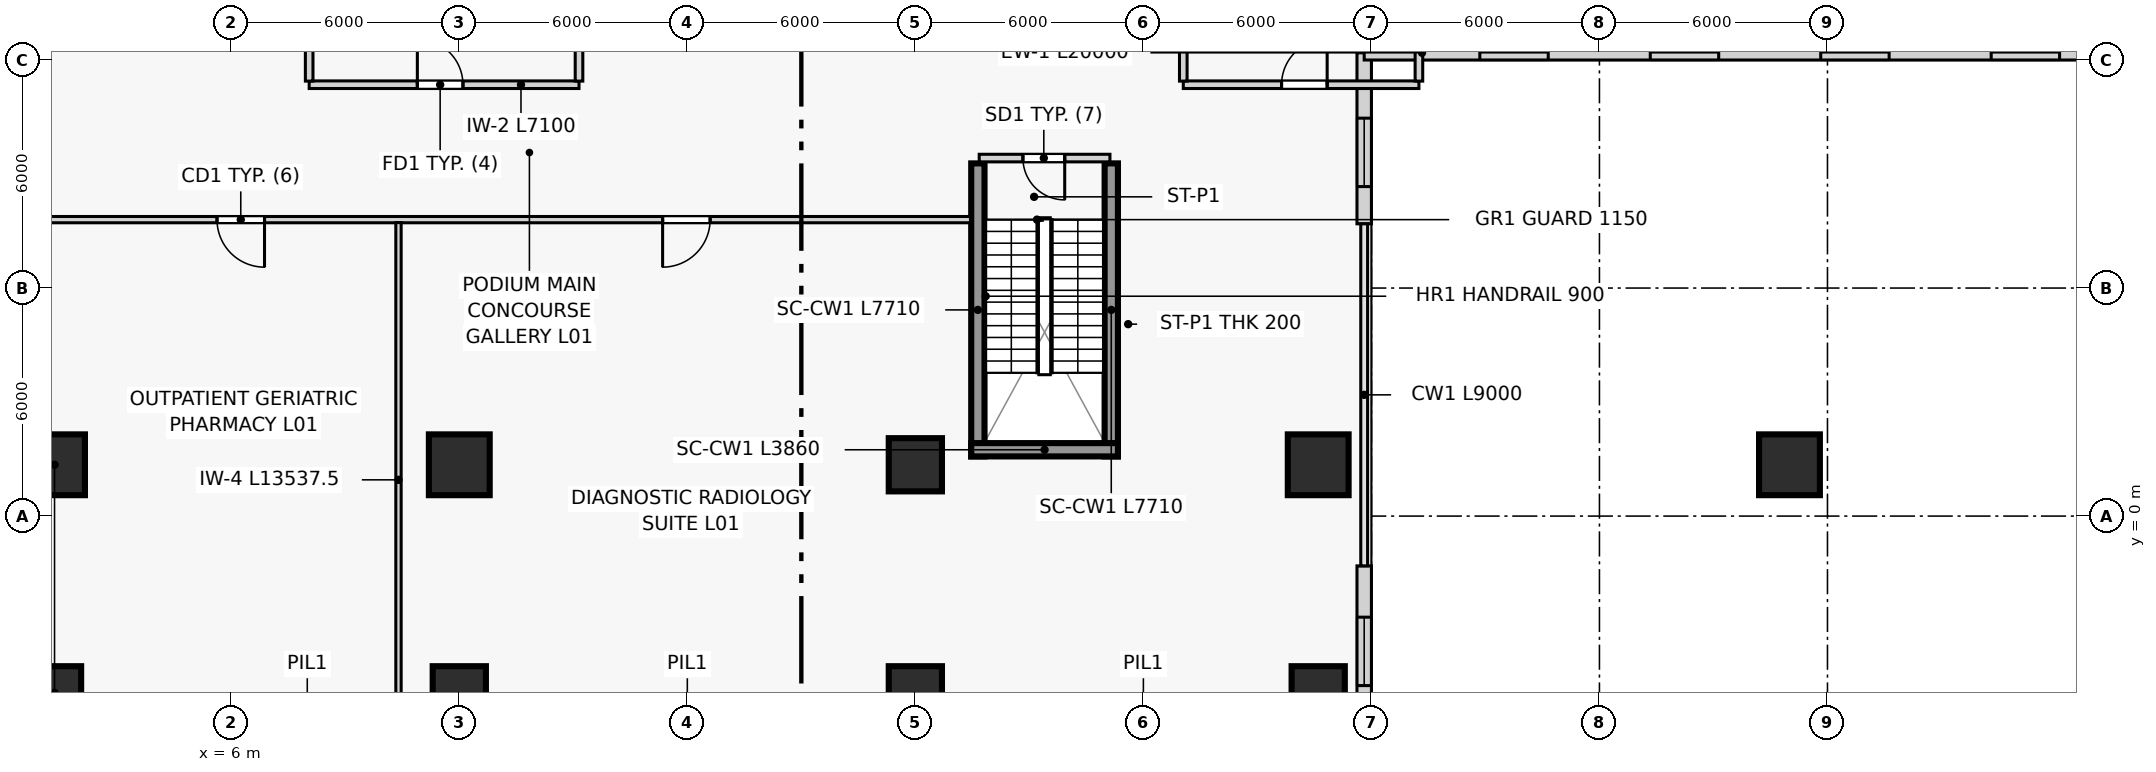
"""IFC4 building model, lengths in metres.
Left out: names, types, materials, properties, quantities, classifications, styles, units other than length and angle.
Written with IfcOpenShell. Run it as: python <this file> out.ifc"""

import sys

from ifc_helpers import new_model, si_unit, direction, frame, frame_2d, origin, origin_2d, place, context, subcontext, project, spatial, rectangle, extrude, source, transform, mapped, element, fill, save


model = new_model("IFC4")
c1 = context("Model", 3, precision=1e-05, world=origin(), true_north=direction((0.0, 1.0)))
c2 = subcontext(c1, "Body", "Model", "MODEL_VIEW")
j1 = project(units=[si_unit("LENGTHUNIT", "METRE"), si_unit("PLANEANGLEUNIT", "RADIAN")], contexts=[c1])
p1 = place(None, origin())
s1 = spatial("IfcSite", under=j1, at=p1, CompositionType="ELEMENT")
p2 = place(p1, origin())
s2 = spatial("IfcBuilding", under=s1, at=p2, CompositionType="ELEMENT")
p3 = place(p2, frame((0.0, 0.0, 4.5)))
s3 = spatial("IfcBuildingStorey", under=s2, at=p3, CompositionType="ELEMENT", Elevation=4.5)
for number, where, z_axis, x_axis in (
    (1, (25.645, 1.57, 0.0), (0.0, 0.0, 1.0), (0.0, 1.0, 0.0)),
    (2, (29.155, 1.57, 0.0), (0.0, 0.0, 1.0), (0.0, 1.0, 0.0)),
):
    element("IfcWall", number, at=place(p3, frame(where, z_axis=z_axis, x_axis=x_axis)), inside=s3, PredefinedType="SHEAR", context=c2, shape_type="SweptSolid", body=[
        extrude(rectangle(XDim=7.71, YDim=0.35, at=frame_2d((3.855, 0.0))), origin(), (0.0, 0.0, 1.0), 4.5),
    ])
p4 = place(p3, frame((25.47, 1.745, 0.0), z_axis=(0.0, 0.0, 1.0), x_axis=(1.0, 0.0, 0.0)))
e3 = element("IfcWall", 3, at=p4, inside=s3, PredefinedType="SHEAR", context=c2, shape_type="SweptSolid", body=[
    extrude(rectangle(XDim=3.86, YDim=0.35, at=frame_2d((1.93, 0.0))), origin(), (0.0, 0.0, 1.0), 4.5),
])
m1 = source(origin(), c2, "Body", "SweptSolid", [
    extrude(rectangle(XDim=1.4, YDim=1.4, at=origin_2d()), origin(), (0.0, 0.0, 1.0), 4.5),
])
p5 = place(p3, frame((1.35, -4.65, 0.0), z_axis=(0.0, 0.0, 1.0), x_axis=(1.0, 0.0, 0.0)))
e4 = element("IfcColumn", 4, at=p5, inside=s3, PredefinedType="COLUMN", context=c2, shape_type="MappedRepresentation", body=[
    mapped(m1, transform((0.0, 0.0, 0.0), scale=1.0)),
])
m2 = source(origin(), c2, "Body", "SweptSolid", [
    extrude(rectangle(XDim=1.6, YDim=1.6, at=origin_2d()), origin(), (0.0, 0.0, 1.0), 4.5),
])
p6 = place(p3, frame((1.35, 1.35, 0.0), z_axis=(0.0, 0.0, 1.0), x_axis=(1.0, 0.0, 0.0)))
e5 = element("IfcColumn", 5, at=p6, inside=s3, PredefinedType="COLUMN", context=c2, shape_type="MappedRepresentation", body=[
    mapped(m2, transform((0.0, 0.0, 0.0), scale=1.0)),
])
p7 = place(p3, frame((12.0, -4.65, 0.0), z_axis=(0.0, 0.0, 1.0), x_axis=(1.0, 0.0, 0.0)))
e6 = element("IfcColumn", 6, at=p7, inside=s3, PredefinedType="COLUMN", context=c2, shape_type="MappedRepresentation", body=[
    mapped(m1, transform((0.0, 0.0, 0.0), scale=1.0)),
])
p8 = place(p3, frame((12.0, 1.35, 0.0), z_axis=(0.0, 0.0, 1.0), x_axis=(1.0, 0.0, 0.0)))
e7 = element("IfcColumn", 7, at=p8, inside=s3, PredefinedType="COLUMN", context=c2, shape_type="MappedRepresentation", body=[
    mapped(m2, transform((0.0, 0.0, 0.0), scale=1.0)),
])
for number, where, z_axis, x_axis in (
    (8, (24.0, -4.65, 0.0), (0.0, 0.0, 1.0), (1.0, 0.0, 0.0)),
    (9, (24.0, 1.35, 0.0), (0.0, 0.0, 1.0), (1.0, 0.0, 0.0)),
    (10, (34.6, -4.65, 0.0), (0.0, 0.0, 1.0), (1.0, 0.0, 0.0)),
):
    element("IfcColumn", number, at=place(p3, frame(where, z_axis=z_axis, x_axis=x_axis)), inside=s3, PredefinedType="COLUMN", context=c2, shape_type="MappedRepresentation", body=[
        mapped(m1, transform((0.0, 0.0, 0.0), scale=1.0)),
    ])
for number, where, z_axis, x_axis in (
    (11, (34.6, 1.35, 0.0), (0.0, 0.0, 1.0), (1.0, 0.0, 0.0)),
    (12, (47.0, 1.35, 0.0), (0.0, 0.0, 1.0), (1.0, 0.0, 0.0)),
):
    element("IfcColumn", number, at=place(p3, frame(where, z_axis=z_axis, x_axis=x_axis)), inside=s3, PredefinedType="COLUMN", context=c2, shape_type="MappedRepresentation", body=[
        mapped(m2, transform((0.0, 0.0, 0.0), scale=1.0)),
    ])
p9 = place(p3, frame((35.81, -5.81, 0.0), z_axis=(0.0, 0.0, 1.0), x_axis=(0.0, 1.0, 0.0)))
e13 = element("IfcWall", 13, at=p9, inside=s3, PredefinedType="SOLIDWALL", context=c2, shape_type="SweptSolid", body=[
    extrude(rectangle(XDim=4.5, YDim=0.38, at=frame_2d((2.25, 0.0))), origin(), (0.0, 0.0, 1.0), 4.16),
])
p10 = place(p9, frame((1.35, 0.0, 0.8)))
e14 = element("IfcOpeningElement", 14, at=p10, cuts=e13, PredefinedType="OPENING", context=c2, shape_type="SweptSolid", body=[
    extrude(rectangle(XDim=1.8, YDim=2.1, at=frame_2d((0.9, 1.05))), frame((0.0, 0.2, 0.0), z_axis=(0.0, -1.0, 0.0), x_axis=(1.0, 0.0, 0.0)), (0.0, 0.0, 1.0), 0.4),
])
p11 = place(p3, frame((35.81, 7.69, 0.0), z_axis=(0.0, 0.0, 1.0), x_axis=(0.0, 1.0, 0.0)))
e15 = element("IfcWall", 15, at=p11, inside=s3, PredefinedType="SOLIDWALL", context=c2, shape_type="SweptSolid", body=[
    extrude(rectangle(XDim=4.5, YDim=0.38, at=frame_2d((2.25, 0.0))), origin(), (0.0, 0.0, 1.0), 4.16),
])
p12 = place(p11, frame((0.98, 0.0, 0.8)))
e16 = element("IfcOpeningElement", 16, at=p12, cuts=e15, PredefinedType="OPENING", context=c2, shape_type="SweptSolid", body=[
    extrude(rectangle(XDim=1.8, YDim=2.1, at=frame_2d((0.9, 1.05))), frame((0.0, 0.2, 0.0), z_axis=(0.0, -1.0, 0.0), x_axis=(1.0, 0.0, 0.0)), (0.0, 0.0, 1.0), 0.4),
])
p13 = place(p3, frame((35.81, 12.19, 0.0), z_axis=(0.0, 0.0, 1.0), x_axis=(1.0, 0.0, 0.0)))
e17 = element("IfcWall", 17, at=p13, inside=s3, PredefinedType="SOLIDWALL", context=c2, shape_type="SweptSolid", body=[
    extrude(rectangle(XDim=20.0, YDim=0.38, at=frame_2d((10.0, 0.0))), origin(), (0.0, 0.0, 1.0), 4.16),
])
p14 = place(p13, frame((3.042, 0.0, 0.8)))
e18 = element("IfcOpeningElement", 18, at=p14, cuts=e17, PredefinedType="OPENING", context=c2, shape_type="SweptSolid", body=[
    extrude(rectangle(XDim=1.8, YDim=2.1, at=frame_2d((0.9, 1.05))), frame((0.0, 0.2, 0.0), z_axis=(0.0, -1.0, 0.0), x_axis=(1.0, 0.0, 0.0)), (0.0, 0.0, 1.0), 0.4),
])
p15 = place(p13, frame((7.528, 0.0, 0.8)))
e19 = element("IfcOpeningElement", 19, at=p15, cuts=e17, PredefinedType="OPENING", context=c2, shape_type="SweptSolid", body=[
    extrude(rectangle(XDim=1.8, YDim=2.1, at=frame_2d((0.9, 1.05))), frame((0.0, 0.2, 0.0), z_axis=(0.0, -1.0, 0.0), x_axis=(1.0, 0.0, 0.0)), (0.0, 0.0, 1.0), 0.4),
])
p16 = place(p13, frame((12.012, 0.0, 0.8)))
e20 = element("IfcOpeningElement", 20, at=p16, cuts=e17, PredefinedType="OPENING", context=c2, shape_type="SweptSolid", body=[
    extrude(rectangle(XDim=1.8, YDim=2.1, at=frame_2d((0.9, 1.05))), frame((0.0, 0.2, 0.0), z_axis=(0.0, -1.0, 0.0), x_axis=(1.0, 0.0, 0.0)), (0.0, 0.0, 1.0), 0.4),
])
p17 = place(p13, frame((16.498, 0.0, 0.8)))
e21 = element("IfcOpeningElement", 21, at=p17, cuts=e17, PredefinedType="OPENING", context=c2, shape_type="SweptSolid", body=[
    extrude(rectangle(XDim=1.8, YDim=2.1, at=frame_2d((0.9, 1.05))), frame((0.0, 0.2, 0.0), z_axis=(0.0, -1.0, 0.0), x_axis=(1.0, 0.0, 0.0)), (0.0, 0.0, 1.0), 0.4),
])
p18 = place(p3, frame((8.05, 11.35, 0.0), z_axis=(0.0, 0.0, 1.0), x_axis=(1.0, 0.0, 0.0)))
e22 = element("IfcWall", 22, at=p18, inside=s3, PredefinedType="PARTITIONING", context=c2, shape_type="SweptSolid", body=[
    extrude(rectangle(XDim=7.1, YDim=0.2, at=frame_2d((3.55, 0.0))), origin(), (0.0, 0.0, 1.0), 4.16),
])
p19 = place(p18, frame((2.846, 0.0, 0.0)))
e23 = element("IfcOpeningElement", 23, at=p19, cuts=e22, PredefinedType="OPENING", context=c2, shape_type="SweptSolid", body=[
    extrude(rectangle(XDim=1.2, YDim=2.2, at=frame_2d((0.6, 1.1))), frame((0.0, 0.11, 0.0), z_axis=(0.0, -1.0, 0.0), x_axis=(1.0, 0.0, 0.0)), (0.0, 0.0, 1.0), 0.22),
])
for number, where, z_axis, x_axis in (
    (24, (8.05, 11.445, 0.0), (0.0, 0.0, 1.0), (0.0, 1.0, 0.0)),
    (25, (15.15, 11.445, 0.0), (0.0, 0.0, 1.0), (0.0, 1.0, 0.0)),
):
    element("IfcWall", number, at=place(p3, frame(where, z_axis=z_axis, x_axis=x_axis)), inside=s3, PredefinedType="PARTITIONING", context=c2, shape_type="SweptSolid", body=[
        extrude(rectangle(XDim=2.985, YDim=0.2, at=frame_2d((1.492, 0.0))), origin(), (0.0, 0.0, 1.0), 4.16),
    ])
p20 = place(p3, frame((31.05, 11.35, 0.0), z_axis=(0.0, 0.0, 1.0), x_axis=(1.0, 0.0, 0.0)))
e26 = element("IfcWall", 26, at=p20, inside=s3, PredefinedType="PARTITIONING", context=c2, shape_type="SweptSolid", body=[
    extrude(rectangle(XDim=6.2, YDim=0.2, at=frame_2d((3.1, 0.0))), origin(), (0.0, 0.0, 1.0), 4.16),
])
p21 = place(p20, frame((2.586, 0.0, 0.0)))
e27 = element("IfcOpeningElement", 27, at=p21, cuts=e26, PredefinedType="OPENING", context=c2, shape_type="SweptSolid", body=[
    extrude(rectangle(XDim=1.2, YDim=2.2, at=frame_2d((0.6, 1.1))), frame((0.0, 0.11, 0.0), z_axis=(0.0, -1.0, 0.0), x_axis=(1.0, 0.0, 0.0)), (0.0, 0.0, 1.0), 0.22),
])
for number, where, z_axis, x_axis in (
    (28, (31.05, 11.445, 0.0), (0.0, 0.0, 1.0), (0.0, 1.0, 0.0)),
    (29, (37.25, 11.445, 0.0), (0.0, 0.0, 1.0), (0.0, 1.0, 0.0)),
):
    element("IfcWall", number, at=place(p3, frame(where, z_axis=z_axis, x_axis=x_axis)), inside=s3, PredefinedType="PARTITIONING", context=c2, shape_type="SweptSolid", body=[
        extrude(rectangle(XDim=2.985, YDim=0.2, at=frame_2d((1.492, 0.0))), origin(), (0.0, 0.0, 1.0), 4.16),
    ])
p22 = place(p3, frame((25.68, 9.42, 0.0), z_axis=(0.0, 0.0, 1.0), x_axis=(1.0, 0.0, 0.0)))
e30 = element("IfcWall", 30, at=p22, inside=s3, PredefinedType="PARTITIONING", context=c2, shape_type="SweptSolid", body=[
    extrude(rectangle(XDim=3.44, YDim=0.2, at=frame_2d((1.72, 0.0))), origin(), (0.0, 0.0, 1.0), 4.16),
])
p23 = place(p22, frame((1.15, 0.0, 0.0)))
e31 = element("IfcOpeningElement", 31, at=p23, cuts=e30, PredefinedType="OPENING", context=c2, shape_type="SweptSolid", body=[
    extrude(rectangle(XDim=1.1, YDim=2.2, at=frame_2d((0.55, 1.1))), frame((0.0, 0.11, 0.0), z_axis=(0.0, -1.0, 0.0), x_axis=(1.0, 0.0, 0.0)), (0.0, 0.0, 1.0), 0.22),
])
p24 = place(p3, frame((0.185, 7.8, 0.0), z_axis=(0.0, 0.0, 1.0), x_axis=(1.0, 0.0, 0.0)))
e32 = element("IfcWall", 32, at=p24, inside=s3, PredefinedType="PARTITIONING", context=c2, shape_type="SweptSolid", body=[
    extrude(rectangle(XDim=25.265, YDim=0.165, at=frame_2d((12.632, 0.0))), origin(), (0.0, 0.0, 1.0), 4.16),
])
p25 = place(p24, frame((5.44, 0.0, 0.0)))
e33 = element("IfcOpeningElement", 33, at=p25, cuts=e32, PredefinedType="OPENING", context=c2, shape_type="SweptSolid", body=[
    extrude(rectangle(XDim=1.25, YDim=2.2, at=frame_2d((0.625, 1.1))), frame((0.0, 0.093, 0.0), z_axis=(0.0, -1.0, 0.0), x_axis=(1.0, 0.0, 0.0)), (0.0, 0.0, 1.0), 0.185),
])
p26 = place(p24, frame((17.165, 0.0, 0.0)))
e34 = element("IfcOpeningElement", 34, at=p26, cuts=e32, PredefinedType="OPENING", context=c2, shape_type="SweptSolid", body=[
    extrude(rectangle(XDim=1.25, YDim=2.2, at=frame_2d((0.625, 1.1))), frame((0.0, 0.093, 0.0), z_axis=(0.0, -1.0, 0.0), x_axis=(1.0, 0.0, 0.0)), (0.0, 0.0, 1.0), 0.185),
])
p27 = place(p3, frame((10.4, -5.815, 0.0), z_axis=(0.0, 0.0, 1.0), x_axis=(0.0, 1.0, 0.0)))
e35 = element("IfcWall", 35, at=p27, inside=s3, PredefinedType="PARTITIONING", context=c2, shape_type="SweptSolid", body=[
    extrude(rectangle(XDim=13.537, YDim=0.14, at=frame_2d((6.769, 0.0))), origin(), (0.0, 0.0, 1.0), 4.16),
])
m3 = source(origin(), c2, "Body", "SweptSolid", [
    extrude(rectangle(XDim=1.8, YDim=2.1, at=frame_2d((0.9, 1.05))), frame((0.0, 0.03, 0.0), z_axis=(0.0, -1.0, 0.0), x_axis=(1.0, 0.0, 0.0)), (0.0, 0.0, 1.0), 0.06),
])
p28 = place(p10, origin())
e36 = element("IfcWindow", 36, at=p28, inside=s3, PartitioningType="SINGLE_PANEL", PredefinedType="WINDOW", context=c2, shape_type="MappedRepresentation", body=[
    mapped(m3, transform((0.0, 0.0, 0.0), scale=1.0)),
])
fill(e14, e36)
p29 = place(p12, origin())
e37 = element("IfcWindow", 37, at=p29, inside=s3, PartitioningType="SINGLE_PANEL", PredefinedType="WINDOW", context=c2, shape_type="MappedRepresentation", body=[
    mapped(m3, transform((0.0, 0.0, 0.0), scale=1.0)),
])
fill(e16, e37)
p30 = place(p14, origin())
e38 = element("IfcWindow", 38, at=p30, inside=s3, PartitioningType="SINGLE_PANEL", PredefinedType="WINDOW", context=c2, shape_type="MappedRepresentation", body=[
    mapped(m3, transform((0.0, 0.0, 0.0), scale=1.0)),
])
fill(e18, e38)
p31 = place(p15, origin())
e39 = element("IfcWindow", 39, at=p31, inside=s3, PartitioningType="SINGLE_PANEL", PredefinedType="WINDOW", context=c2, shape_type="MappedRepresentation", body=[
    mapped(m3, transform((0.0, 0.0, 0.0), scale=1.0)),
])
fill(e19, e39)
p32 = place(p16, origin())
e40 = element("IfcWindow", 40, at=p32, inside=s3, PartitioningType="SINGLE_PANEL", PredefinedType="WINDOW", context=c2, shape_type="MappedRepresentation", body=[
    mapped(m3, transform((0.0, 0.0, 0.0), scale=1.0)),
])
fill(e20, e40)
p33 = place(p17, origin())
e41 = element("IfcWindow", 41, at=p33, inside=s3, PartitioningType="SINGLE_PANEL", PredefinedType="WINDOW", context=c2, shape_type="MappedRepresentation", body=[
    mapped(m3, transform((0.0, 0.0, 0.0), scale=1.0)),
])
fill(e21, e41)
m4 = source(origin(), c2, "Body", "SweptSolid", [
    extrude(rectangle(XDim=1.2, YDim=2.2, at=frame_2d((0.6, 1.1))), frame((0.0, 0.025, 0.0), z_axis=(0.0, -1.0, 0.0), x_axis=(1.0, 0.0, 0.0)), (0.0, 0.0, 1.0), 0.05),
])
p34 = place(p19, origin())
e42 = element("IfcDoor", 42, at=p34, inside=s3, OperationType="SINGLE_SWING_LEFT", PredefinedType="DOOR", context=c2, shape_type="MappedRepresentation", body=[
    mapped(m4, transform((0.0, 0.0, 0.0), scale=1.0)),
])
fill(e23, e42)
p35 = place(p21, origin())
e43 = element("IfcDoor", 43, at=p35, inside=s3, OperationType="SINGLE_SWING_RIGHT", PredefinedType="DOOR", context=c2, shape_type="MappedRepresentation", body=[
    mapped(m4, transform((0.0, 0.0, 0.0), scale=1.0)),
])
fill(e27, e43)
m5 = source(origin(), c2, "Body", "SweptSolid", [
    extrude(rectangle(XDim=1.1, YDim=2.2, at=frame_2d((0.55, 1.1))), frame((0.0, 0.025, 0.0), z_axis=(0.0, -1.0, 0.0), x_axis=(1.0, 0.0, 0.0)), (0.0, 0.0, 1.0), 0.05),
])
p36 = place(p23, frame((1.1, 0.0, 0.0), z_axis=(0.0, 0.0, 1.0), x_axis=(-1.0, 0.0, 0.0)))
e44 = element("IfcDoor", 44, at=p36, inside=s3, OperationType="SINGLE_SWING_LEFT", PredefinedType="DOOR", context=c2, shape_type="MappedRepresentation", body=[
    mapped(m5, transform((0.0, 0.0, 0.0), scale=1.0)),
])
fill(e31, e44)
m6 = source(origin(), c2, "Body", "SweptSolid", [
    extrude(rectangle(XDim=1.25, YDim=2.2, at=frame_2d((0.625, 1.1))), frame((0.0, 0.025, 0.0), z_axis=(0.0, -1.0, 0.0), x_axis=(1.0, 0.0, 0.0)), (0.0, 0.0, 1.0), 0.05),
])
p37 = place(p25, frame((1.25, 0.0, 0.0), z_axis=(0.0, 0.0, 1.0), x_axis=(-1.0, 0.0, 0.0)))
e45 = element("IfcDoor", 45, at=p37, inside=s3, OperationType="SINGLE_SWING_LEFT", PredefinedType="DOOR", context=c2, shape_type="MappedRepresentation", body=[
    mapped(m6, transform((0.0, 0.0, 0.0), scale=1.0)),
])
fill(e33, e45)
p38 = place(p26, frame((1.25, 0.0, 0.0), z_axis=(0.0, 0.0, 1.0), x_axis=(-1.0, 0.0, 0.0)))
e46 = element("IfcDoor", 46, at=p38, inside=s3, OperationType="SINGLE_SWING_RIGHT", PredefinedType="DOOR", context=c2, shape_type="MappedRepresentation", body=[
    mapped(m6, transform((0.0, 0.0, 0.0), scale=1.0)),
])
fill(e34, e46)
save(model, sys.argv[1])
